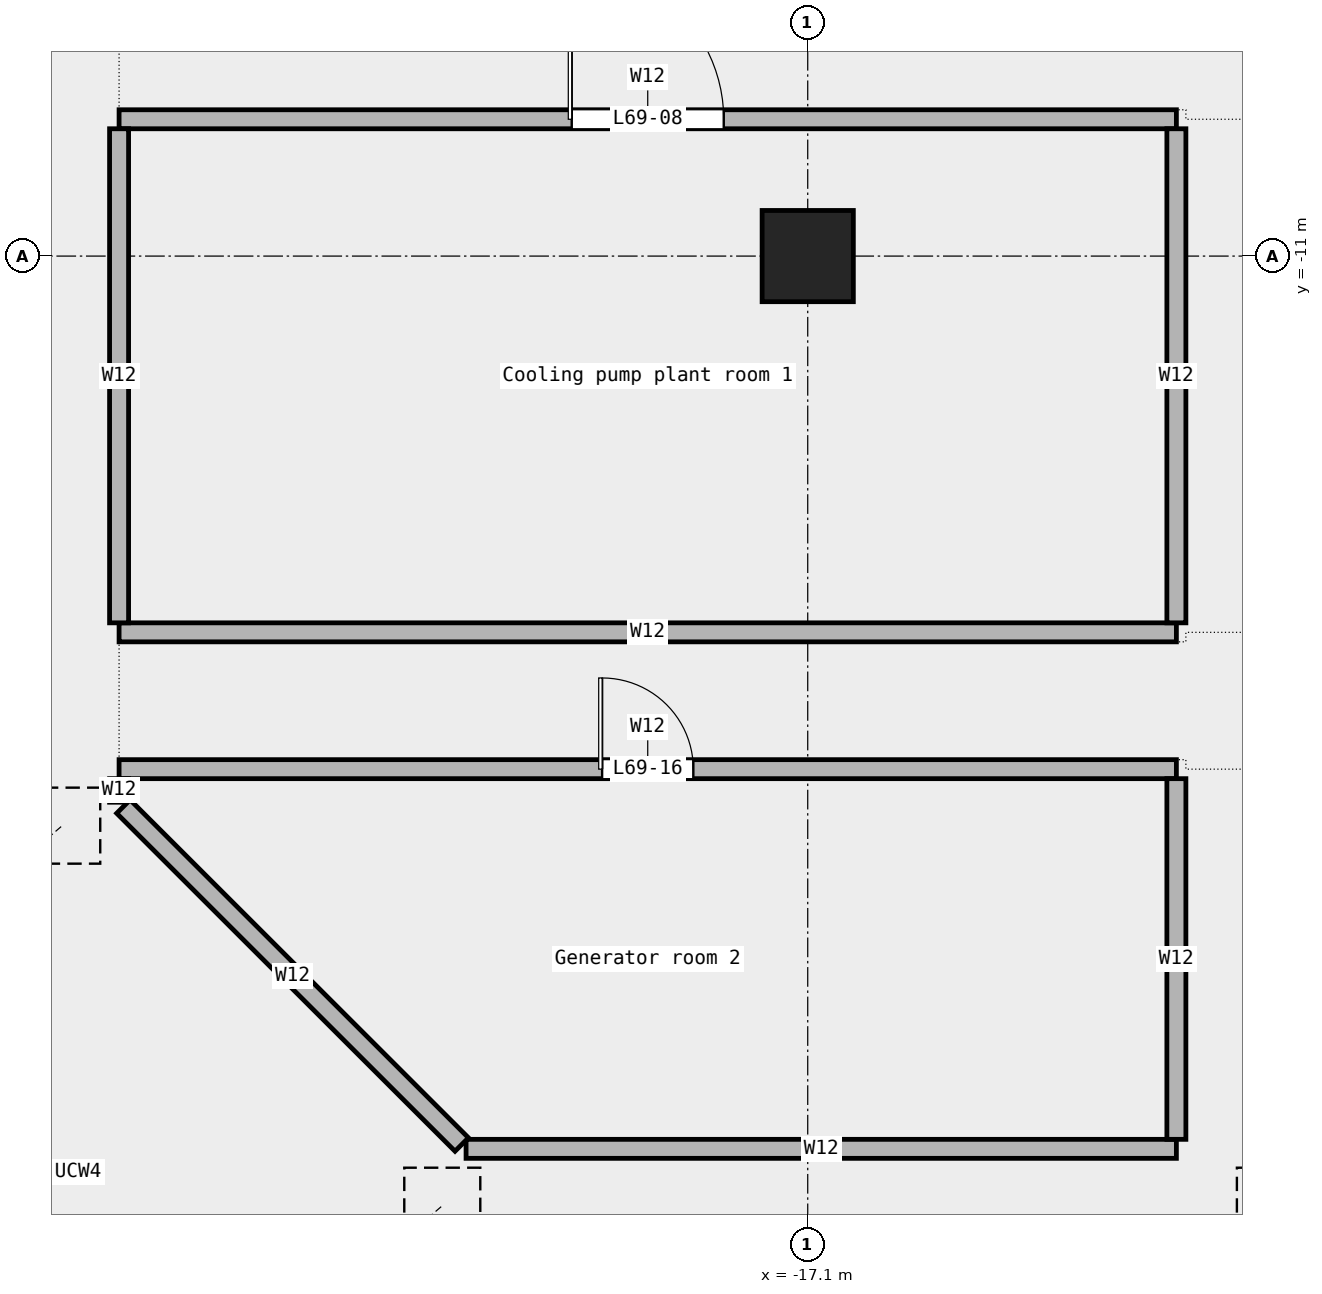
"""IFC4 building model, lengths in metres.
Left out: names, types, materials, properties, quantities, classifications, styles, units other than length and angle.
Written with IfcOpenShell. Run it as: python <this file> out.ifc"""

import sys

from ifc_helpers import new_model, si_unit, direction, frame, frame_2d, origin, origin_2d, place, context, subcontext, project, spatial, rectangle, extrude, element, fill, save


model = new_model("IFC4")
c1 = context("Model", 3, precision=1e-05, world=origin(), true_north=direction((0.0, 1.0)))
c2 = subcontext(c1, "Body", "Model", "MODEL_VIEW")
j1 = project(units=[si_unit("LENGTHUNIT", "METRE"), si_unit("PLANEANGLEUNIT", "RADIAN")], contexts=[c1])
p1 = place(None, origin())
s1 = spatial("IfcSite", under=j1, at=p1, CompositionType="ELEMENT")
p2 = place(p1, origin())
s2 = spatial("IfcBuilding", under=s1, at=p2, CompositionType="ELEMENT")
p3 = place(p2, frame((0.0, 0.0, 315.4)))
s3 = spatial("IfcBuildingStorey", under=s2, at=p3, CompositionType="ELEMENT", Elevation=315.4)
p4 = place(p3, frame((-23.65, -25.0, 0.0), z_axis=(0.285491312898, 0.246958988536, 0.926016181414), x_axis=(-0.654224042746, 0.756300801198, 0.0)))
e1 = element("IfcColumn", 1, at=p4, inside=s3, PredefinedType="COLUMN", context=c2, shape_type="SweptSolid", body=[
    extrude(rectangle(XDim=1.0, YDim=1.0, at=origin_2d()), origin(), (0.0, 0.0, 1.0), 6.102),
])
p5 = place(p3, frame((-11.825, -25.0, 0.0), z_axis=(0.147339596113, 0.254871072649, 0.955683932974), x_axis=(-0.865746227022, 0.500483236879, 0.0)))
e2 = element("IfcColumn", 2, at=p5, inside=s3, PredefinedType="COLUMN", context=c2, shape_type="SweptSolid", body=[
    extrude(rectangle(XDim=1.0, YDim=1.0, at=origin_2d()), origin(), (0.0, 0.0, 1.0), 5.912),
])
p6 = place(p3, frame((-28.65, -20.0, 0.0), z_axis=(0.285491312898, 0.246958988536, 0.926016181414), x_axis=(-0.654224042746, 0.756300801198, 0.0)))
e3 = element("IfcColumn", 3, at=p6, inside=s3, PredefinedType="COLUMN", context=c2, shape_type="SweptSolid", body=[
    extrude(rectangle(XDim=1.0, YDim=1.0, at=origin_2d()), origin(), (0.0, 0.0, 1.0), 6.102),
])
p7 = place(p3, frame((-17.1, -11.0, 0.0), z_axis=(0.0, 0.0, 1.0), x_axis=(1.0, 0.0, 0.0)))
e4 = element("IfcColumn", 4, at=p7, inside=s3, PredefinedType="COLUMN", context=c2, shape_type="SweptSolid", body=[
    extrude(rectangle(XDim=1.2, YDim=1.2, at=origin_2d()), origin(), (0.0, 0.0, 1.0), 5.65),
])
p8 = place(p3, frame((-21.595, -22.745, 0.0), z_axis=(0.0, 0.0, 1.0), x_axis=(1.0, 0.0, 0.0)))
e5 = element("IfcWall", 5, at=p8, inside=s3, PredefinedType="PARTITIONING", context=c2, shape_type="SweptSolid", body=[
    extrude(rectangle(XDim=9.345, YDim=0.25, at=frame_2d((4.672, 0.0))), origin(), (0.0, 0.0, 1.0), 5.65),
])
p9 = place(p3, frame((-26.16, -17.75, 0.0), z_axis=(0.0, 0.0, 1.0), x_axis=(1.0, 0.0, 0.0)))
e6 = element("IfcWall", 6, at=p9, inside=s3, PredefinedType="PARTITIONING", context=c2, shape_type="SweptSolid", body=[
    extrude(rectangle(XDim=13.91, YDim=0.25, at=frame_2d((6.955, 0.0))), origin(), (0.0, 0.0, 1.0), 5.65),
])
p10 = place(p9, frame((6.355, 0.0, 0.0)))
e7 = element("IfcOpeningElement", 7, at=p10, cuts=e6, PredefinedType="OPENING", context=c2, shape_type="SweptSolid", body=[
    extrude(rectangle(XDim=1.2, YDim=2.1, at=frame_2d((0.6, 1.05))), frame((0.0, 0.137, 0.0), z_axis=(0.0, -1.0, 0.0), x_axis=(1.0, 0.0, 0.0)), (0.0, 0.0, 1.0), 0.274),
])
p11 = place(p3, frame((-26.16, -15.95, 0.0), z_axis=(0.0, 0.0, 1.0), x_axis=(1.0, 0.0, 0.0)))
e8 = element("IfcWall", 8, at=p11, inside=s3, PredefinedType="PARTITIONING", context=c2, shape_type="SweptSolid", body=[
    extrude(rectangle(XDim=13.91, YDim=0.25, at=frame_2d((6.955, 0.0))), origin(), (0.0, 0.0, 1.0), 5.65),
])
p12 = place(p3, frame((-26.16, -9.2, 0.0), z_axis=(0.0, 0.0, 1.0), x_axis=(1.0, 0.0, 0.0)))
e9 = element("IfcWall", 9, at=p12, inside=s3, PredefinedType="PARTITIONING", context=c2, shape_type="SweptSolid", body=[
    extrude(rectangle(XDim=13.91, YDim=0.25, at=frame_2d((6.955, 0.0))), origin(), (0.0, 0.0, 1.0), 5.65),
])
p13 = place(p12, frame((5.955, 0.0, 0.0)))
e10 = element("IfcOpeningElement", 10, at=p13, cuts=e9, PredefinedType="OPENING", context=c2, shape_type="SweptSolid", body=[
    extrude(rectangle(XDim=2.0, YDim=2.1, at=frame_2d((1.0, 1.05))), frame((0.0, 0.137, 0.0), z_axis=(0.0, -1.0, 0.0), x_axis=(1.0, 0.0, 0.0)), (0.0, 0.0, 1.0), 0.274),
])
p14 = place(p3, frame((-26.16, -18.185, 0.0), z_axis=(0.0, 0.0, 1.0), x_axis=(0.0, 1.0, 0.0)))
e11 = element("IfcWall", 11, at=p14, inside=s3, PredefinedType="PARTITIONING", context=c2, shape_type="SweptSolid", body=[
    extrude(rectangle(XDim=0.31, YDim=0.25, at=frame_2d((0.155, 0.0))), origin(), (0.0, 0.0, 1.0), 5.65),
])
p15 = place(p3, frame((-26.16, -15.825, 0.0), z_axis=(0.0, 0.0, 1.0), x_axis=(0.0, 1.0, 0.0)))
e12 = element("IfcWall", 12, at=p15, inside=s3, PredefinedType="PARTITIONING", context=c2, shape_type="SweptSolid", body=[
    extrude(rectangle(XDim=6.5, YDim=0.25, at=frame_2d((3.25, 0.0))), origin(), (0.0, 0.0, 1.0), 5.65),
])
p16 = place(p3, frame((-12.25, -22.62, 0.0), z_axis=(0.0, 0.0, 1.0), x_axis=(0.0, 1.0, 0.0)))
e13 = element("IfcWall", 13, at=p16, inside=s3, PredefinedType="PARTITIONING", context=c2, shape_type="SweptSolid", body=[
    extrude(rectangle(XDim=4.745, YDim=0.25, at=frame_2d((2.373, 0.0))), origin(), (0.0, 0.0, 1.0), 5.65),
])
p17 = place(p3, frame((-12.25, -15.825, 0.0), z_axis=(0.0, 0.0, 1.0), x_axis=(0.0, 1.0, 0.0)))
e14 = element("IfcWall", 14, at=p17, inside=s3, PredefinedType="PARTITIONING", context=c2, shape_type="SweptSolid", body=[
    extrude(rectangle(XDim=6.5, YDim=0.25, at=frame_2d((3.25, 0.0))), origin(), (0.0, 0.0, 1.0), 5.65),
])
p18 = place(p3, frame((-21.652, -22.688, 0.0), z_axis=(0.0, 0.0, 1.0), x_axis=(-0.707494747071, 0.706718602321, 0.0)))
e15 = element("IfcWall", 15, at=p18, inside=s3, PredefinedType="PARTITIONING", context=c2, shape_type="SweptSolid", body=[
    extrude(rectangle(XDim=6.291, YDim=0.25, at=frame_2d((3.146, 0.0))), origin(), (0.0, 0.0, 1.0), 5.65),
])
p19 = place(p13, origin())
e16 = element("IfcDoor", 16, at=p19, inside=s3, OperationType="DOUBLE_DOOR_SINGLE_SWING", PredefinedType="DOOR", context=c2, shape_type="SweptSolid", body=[
    extrude(rectangle(XDim=2.0, YDim=2.1, at=frame_2d((1.0, 1.05))), frame((0.0, 0.025, 0.0), z_axis=(0.0, -1.0, 0.0), x_axis=(1.0, 0.0, 0.0)), (0.0, 0.0, 1.0), 0.05),
])
fill(e10, e16)
p20 = place(p10, origin())
e17 = element("IfcDoor", 17, at=p20, inside=s3, OperationType="SINGLE_SWING_LEFT", PredefinedType="DOOR", context=c2, shape_type="SweptSolid", body=[
    extrude(rectangle(XDim=1.2, YDim=2.1, at=frame_2d((0.6, 1.05))), frame((0.0, 0.025, 0.0), z_axis=(0.0, -1.0, 0.0), x_axis=(1.0, 0.0, 0.0)), (0.0, 0.0, 1.0), 0.05),
])
fill(e7, e17)
save(model, sys.argv[1])
